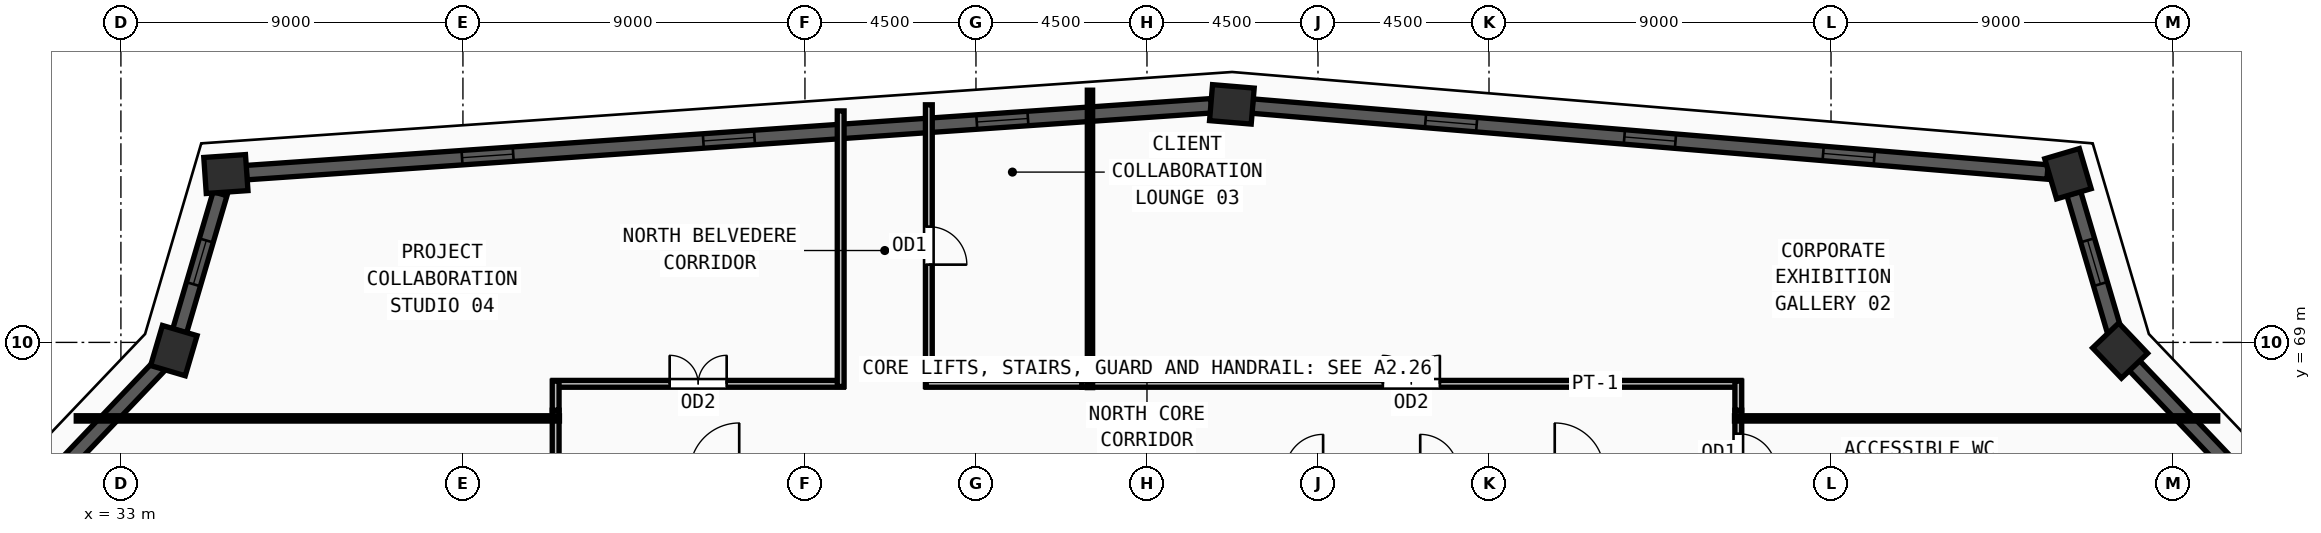
"""IFC4 building model, lengths in metres.
Left out: names, types, materials, properties, quantities, classifications, styles, units other than length and angle.
Written with IfcOpenShell. Run it as: python <this file> out.ifc"""

import sys

from ifc_helpers import new_model, si_unit, direction, frame, frame_2d, origin, origin_2d, place, context, subcontext, project, spatial, rectangle, extrude, source, transform, mapped, element, fill, save


model = new_model("IFC4")
c1 = context("Model", 3, precision=1e-05, world=origin(), true_north=direction((0.0, 1.0)))
c2 = subcontext(c1, "Body", "Model", "MODEL_VIEW")
j1 = project(units=[si_unit("LENGTHUNIT", "METRE"), si_unit("PLANEANGLEUNIT", "RADIAN")], contexts=[c1])
p1 = place(None, origin())
s1 = spatial("IfcSite", under=j1, at=p1, CompositionType="ELEMENT")
p2 = place(p1, origin())
s2 = spatial("IfcBuilding", under=s1, at=p2, CompositionType="ELEMENT")
p3 = place(p2, frame((0.0, 0.0, 339.75)))
s3 = spatial("IfcBuildingStorey", under=s2, at=p3, CompositionType="ELEMENT", Elevation=339.75)
m1 = source(origin(), c2, "Body", "SweptSolid", [
    extrude(rectangle(XDim=1.1, YDim=0.95, at=origin_2d()), origin(), (0.0, 0.0, 1.0), 3.75),
])
for number, where, z_axis, x_axis in (
    (1, (34.393, 68.784, 0.0), (0.0, 0.0, 1.0), (0.283, 0.959, 0.0)),
    (2, (35.762, 73.43, 0.0), (0.0, 0.0, 1.0), (0.998, 0.069, 0.0)),
    (3, (62.234, 75.263, 0.0), (0.0, 0.0, 1.0), (-0.997, 0.083, 0.0)),
    (4, (84.235, 73.438, 0.0), (0.0, 0.0, 1.0), (-0.283, 0.959, 0.0)),
    (5, (85.607, 68.784, 0.0), (0.0, 0.0, 1.0), (-0.689, 0.724, 0.0)),
):
    element("IfcColumn", number, at=place(p3, frame(where, z_axis=z_axis, x_axis=x_axis)), inside=s3, PredefinedType="COLUMN", context=c2, shape_type="MappedRepresentation", body=[
        mapped(m1, transform((0.0, 0.0, 0.0), x_axis=(1.0, 0.0, 0.0), y_axis=(0.0, 1.0, 0.0), z_axis=(0.0, 0.0, 1.0), scale=1.0)),
    ])
p4 = place(p3, frame((88.574, 65.667, 0.0), z_axis=(0.0, 0.0, 1.0), x_axis=(-0.689475358223, 0.72430914008, 0.0)))
e6 = element("IfcWall", 6, at=p4, inside=s3, PredefinedType="SOLIDWALL", context=c2, shape_type="SweptSolid", body=[
    extrude(rectangle(XDim=3.764, YDim=0.38, at=frame_2d((1.882, 0.0))), origin(), (0.0, 0.0, 1.0), 3.57),
])
p5 = place(p3, frame((85.454, 69.302, 0.0), z_axis=(0.0, 0.0, 1.0), x_axis=(-0.282670922676, 0.95921694599, 0.0)))
e7 = element("IfcWall", 7, at=p5, inside=s3, PredefinedType="SOLIDWALL", context=c2, shape_type="SweptSolid", body=[
    extrude(rectangle(XDim=3.772, YDim=0.38, at=frame_2d((1.886, 0.0))), origin(), (0.0, 0.0, 1.0), 3.57),
])
m2 = source(origin(), c2, "Body", "SweptSolid", [
    extrude(rectangle(XDim=1.2, YDim=1.9, at=frame_2d((0.6, 0.95))), frame((0.0, 0.2, 0.0), z_axis=(0.0, -1.0, 0.0), x_axis=(1.0, 0.0, 0.0)), (0.0, 0.0, 1.0), 0.4),
])
p6 = place(p5, frame((1.286, 0.0, 0.55)))
e8 = element("IfcOpeningElement", 8, at=p6, cuts=e7, PredefinedType="OPENING", context=c2, shape_type="MappedRepresentation", body=[
    mapped(m2, transform((0.0, 0.0, 0.0), x_axis=(1.0, 0.0, 0.0), y_axis=(0.0, 1.0, 0.0), z_axis=(0.0, 0.0, 1.0), scale=1.0)),
])
p7 = place(p3, frame((83.697, 73.483, 0.0), z_axis=(0.0, 0.0, 1.0), x_axis=(-0.996579754875, 0.082636506293, 0.0)))
e9 = element("IfcWall", 9, at=p7, inside=s3, PredefinedType="SOLIDWALL", context=c2, shape_type="SweptSolid", body=[
    extrude(rectangle(XDim=20.997, YDim=0.38, at=frame_2d((10.499, 0.0))), origin(), (0.0, 0.0, 1.0), 3.57),
])
m3 = source(origin(), c2, "Body", "SweptSolid", [
    extrude(rectangle(XDim=1.35, YDim=1.85, at=frame_2d((0.675, 0.925))), frame((0.0, 0.2, 0.0), z_axis=(0.0, -1.0, 0.0), x_axis=(1.0, 0.0, 0.0)), (0.0, 0.0, 1.0), 0.4),
])
p8 = place(p7, frame((4.574, 0.0, 0.55)))
e10 = element("IfcOpeningElement", 10, at=p8, cuts=e9, PredefinedType="OPENING", context=c2, shape_type="MappedRepresentation", body=[
    mapped(m3, transform((0.0, 0.0, 0.0), x_axis=(1.0, 0.0, 0.0), y_axis=(0.0, 1.0, 0.0), z_axis=(0.0, 0.0, 1.0), scale=1.0)),
])
p9 = place(p7, frame((9.823, 0.0, 0.55)))
e11 = element("IfcOpeningElement", 11, at=p9, cuts=e9, PredefinedType="OPENING", context=c2, shape_type="MappedRepresentation", body=[
    mapped(m3, transform((0.0, 0.0, 0.0), x_axis=(1.0, 0.0, 0.0), y_axis=(0.0, 1.0, 0.0), z_axis=(0.0, 0.0, 1.0), scale=1.0)),
])
p10 = place(p7, frame((15.073, 0.0, 0.55)))
e12 = element("IfcOpeningElement", 12, at=p10, cuts=e9, PredefinedType="OPENING", context=c2, shape_type="MappedRepresentation", body=[
    mapped(m3, transform((0.0, 0.0, 0.0), x_axis=(1.0, 0.0, 0.0), y_axis=(0.0, 1.0, 0.0), z_axis=(0.0, 0.0, 1.0), scale=1.0)),
])
p11 = place(p3, frame((61.695, 75.226, 0.0), z_axis=(0.0, 0.0, 1.0), x_axis=(-0.997609466084, -0.06910393027, 0.0)))
e13 = element("IfcWall", 13, at=p11, inside=s3, PredefinedType="SOLIDWALL", context=c2, shape_type="SweptSolid", body=[
    extrude(rectangle(XDim=25.455, YDim=0.38, at=frame_2d((12.728, 0.0))), origin(), (0.0, 0.0, 1.0), 3.57),
])
p12 = place(p11, frame((4.839, 0.0, 0.55)))
e14 = element("IfcOpeningElement", 14, at=p12, cuts=e13, PredefinedType="OPENING", context=c2, shape_type="MappedRepresentation", body=[
    mapped(m3, transform((0.0, 0.0, 0.0), x_axis=(1.0, 0.0, 0.0), y_axis=(0.0, 1.0, 0.0), z_axis=(0.0, 0.0, 1.0), scale=1.0)),
])
p13 = place(p11, frame((12.052, 0.0, 0.55)))
e15 = element("IfcOpeningElement", 15, at=p13, cuts=e13, PredefinedType="OPENING", context=c2, shape_type="MappedRepresentation", body=[
    mapped(m3, transform((0.0, 0.0, 0.0), x_axis=(1.0, 0.0, 0.0), y_axis=(0.0, 1.0, 0.0), z_axis=(0.0, 0.0, 1.0), scale=1.0)),
])
p14 = place(p11, frame((18.416, 0.0, 0.55)))
e16 = element("IfcOpeningElement", 16, at=p14, cuts=e13, PredefinedType="OPENING", context=c2, shape_type="MappedRepresentation", body=[
    mapped(m3, transform((0.0, 0.0, 0.0), x_axis=(1.0, 0.0, 0.0), y_axis=(0.0, 1.0, 0.0), z_axis=(0.0, 0.0, 1.0), scale=1.0)),
])
p15 = place(p3, frame((35.609, 72.912, 0.0), z_axis=(0.0, 0.0, 1.0), x_axis=(-0.282457827071, -0.959279717249, 0.0)))
e17 = element("IfcWall", 17, at=p15, inside=s3, PredefinedType="SOLIDWALL", context=c2, shape_type="SweptSolid", body=[
    extrude(rectangle(XDim=3.763, YDim=0.38, at=frame_2d((1.882, 0.0))), origin(), (0.0, 0.0, 1.0), 3.57),
])
p16 = place(p15, frame((1.282, 0.0, 0.55)))
e18 = element("IfcOpeningElement", 18, at=p16, cuts=e17, PredefinedType="OPENING", context=c2, shape_type="MappedRepresentation", body=[
    mapped(m2, transform((0.0, 0.0, 0.0), x_axis=(1.0, 0.0, 0.0), y_axis=(0.0, 1.0, 0.0), z_axis=(0.0, 0.0, 1.0), scale=1.0)),
])
p17 = place(p3, frame((34.021, 68.393, 0.0), z_axis=(0.0, 0.0, 1.0), x_axis=(-0.689516179324, -0.724270279972, 0.0)))
e19 = element("IfcWall", 19, at=p17, inside=s3, PredefinedType="SOLIDWALL", context=c2, shape_type="SweptSolid", body=[
    extrude(rectangle(XDim=3.772, YDim=0.38, at=frame_2d((1.886, 0.0))), origin(), (0.0, 0.0, 1.0), 3.57),
])
p18 = place(p3, frame((75.56, 67.215, 0.0), z_axis=(0.0, 0.0, 1.0), x_axis=(0.0, -1.0, 0.0)))
e20 = element("IfcWall", 20, at=p18, inside=s3, PredefinedType="PARTITIONING", context=c2, shape_type="SweptSolid", body=[
    extrude(rectangle(XDim=2.235, YDim=0.18, at=frame_2d((1.118, 0.0))), origin(), (0.0, 0.0, 1.0), 3.57),
])
m4 = source(origin(), c2, "Body", "SweptSolid", [
    extrude(rectangle(XDim=1.0, YDim=2.2, at=frame_2d((0.5, 1.1))), frame((0.0, 0.1, 0.0), z_axis=(0.0, -1.0, 0.0), x_axis=(1.0, 0.0, 0.0)), (0.0, 0.0, 1.0), 0.2),
])
p19 = place(p18, frame((0.617, 0.0, 0.0)))
e21 = element("IfcOpeningElement", 21, at=p19, cuts=e20, PredefinedType="OPENING", context=c2, shape_type="MappedRepresentation", body=[
    mapped(m4, transform((0.0, 0.0, 0.0), x_axis=(1.0, 0.0, 0.0), y_axis=(0.0, 1.0, 0.0), z_axis=(0.0, 0.0, 1.0), scale=1.0)),
])
p20 = place(p3, frame((58.285, 67.91, 0.0), z_axis=(0.0, 0.0, 1.0), x_axis=(1.0, 0.0, 0.0)))
e22 = element("IfcWall", 22, at=p20, inside=s3, PredefinedType="PARTITIONING", context=c2, shape_type="SweptSolid", body=[
    extrude(rectangle(XDim=17.345, YDim=0.18, at=frame_2d((8.672, 0.0))), origin(), (0.0, 0.0, 1.0), 3.57),
])
m5 = source(origin(), c2, "Body", "SweptSolid", [
    extrude(rectangle(XDim=1.5, YDim=2.2, at=frame_2d((0.75, 1.1))), frame((0.0, 0.1, 0.0), z_axis=(0.0, -1.0, 0.0), x_axis=(1.0, 0.0, 0.0)), (0.0, 0.0, 1.0), 0.2),
])
p21 = place(p20, frame((7.922, 0.0, 0.0)))
e23 = element("IfcOpeningElement", 23, at=p21, cuts=e22, PredefinedType="OPENING", context=c2, shape_type="MappedRepresentation", body=[
    mapped(m5, transform((0.0, 0.0, 0.0), x_axis=(1.0, 0.0, 0.0), y_axis=(0.0, 1.0, 0.0), z_axis=(0.0, 0.0, 1.0), scale=1.0)),
])
p22 = place(p3, frame((54.26, 75.252, 0.0), z_axis=(0.0, 0.0, 1.0), x_axis=(0.0, -1.0, 0.0)))
e24 = element("IfcWall", 24, at=p22, inside=s3, PredefinedType="PARTITIONING", context=c2, shape_type="SweptSolid", body=[
    extrude(rectangle(XDim=7.412, YDim=0.18, at=frame_2d((3.706, 0.0))), origin(), (0.0, 0.0, 1.0), 3.57),
])
p23 = place(p22, frame((3.206, 0.0, 0.0)))
e25 = element("IfcOpeningElement", 25, at=p23, cuts=e24, PredefinedType="OPENING", context=c2, shape_type="MappedRepresentation", body=[
    mapped(m4, transform((0.0, 0.0, 0.0), x_axis=(1.0, 0.0, 0.0), y_axis=(0.0, 1.0, 0.0), z_axis=(0.0, 0.0, 1.0), scale=1.0)),
])
p24 = place(p3, frame((44.37, 67.91, 0.0), z_axis=(0.0, 0.0, 1.0), x_axis=(1.0, 0.0, 0.0)))
e26 = element("IfcWall", 26, at=p24, inside=s3, PredefinedType="PARTITIONING", context=c2, shape_type="SweptSolid", body=[
    extrude(rectangle(XDim=7.64, YDim=0.18, at=frame_2d((3.82, 0.0))), origin(), (0.0, 0.0, 1.0), 3.57),
])
p25 = place(p24, frame((3.07, 0.0, 0.0)))
e27 = element("IfcOpeningElement", 27, at=p25, cuts=e26, PredefinedType="OPENING", context=c2, shape_type="MappedRepresentation", body=[
    mapped(m5, transform((0.0, 0.0, 0.0), x_axis=(1.0, 0.0, 0.0), y_axis=(0.0, 1.0, 0.0), z_axis=(0.0, 0.0, 1.0), scale=1.0)),
])
p26 = place(p3, frame((44.44, 54.285, 0.0), z_axis=(0.0, 0.0, 1.0), x_axis=(0.0, 1.0, 0.0)))
e28 = element("IfcWall", 28, at=p26, inside=s3, PredefinedType="PARTITIONING", context=c2, shape_type="SweptSolid", body=[
    extrude(rectangle(XDim=12.93, YDim=0.18, at=frame_2d((6.465, 0.0))), origin(), (0.0, 0.0, 1.0), 3.261),
])
p27 = place(p26, frame((5.715, 0.0, 0.0)))
e29 = element("IfcOpeningElement", 29, at=p27, cuts=e28, PredefinedType="OPENING", context=c2, shape_type="MappedRepresentation", body=[
    mapped(m5, transform((0.0, 0.0, 0.0), x_axis=(1.0, 0.0, 0.0), y_axis=(0.0, 1.0, 0.0), z_axis=(0.0, 0.0, 1.0), scale=1.0)),
])
p28 = place(p3, frame((75.56, 67.98, 0.0), z_axis=(0.0, 0.0, 1.0), x_axis=(0.0, -1.0, 0.0)))
e30 = element("IfcWall", 30, at=p28, inside=s3, PredefinedType="PARTITIONING", context=c2, shape_type="SweptSolid", body=[
    extrude(rectangle(XDim=0.765, YDim=0.18, at=frame_2d((0.382, 0.0))), origin(), (0.0, 0.0, 1.0), 3.57),
])
p29 = place(p3, frame((54.19, 67.91, 0.0), z_axis=(0.0, 0.0, 1.0), x_axis=(1.0, 0.0, 0.0)))
e31 = element("IfcWall", 31, at=p29, inside=s3, PredefinedType="PARTITIONING", context=c2, shape_type="SweptSolid", body=[
    extrude(rectangle(XDim=4.095, YDim=0.18, at=frame_2d((2.047, 0.0))), origin(), (0.0, 0.0, 1.0), 3.57),
])
p30 = place(p3, frame((51.94, 67.84, 0.0), z_axis=(0.0, 0.0, 1.0), x_axis=(0.0, 1.0, 0.0)))
e32 = element("IfcWall", 32, at=p30, inside=s3, PredefinedType="PARTITIONING", context=c2, shape_type="SweptSolid", body=[
    extrude(rectangle(XDim=7.251, YDim=0.18, at=frame_2d((3.625, 0.0))), origin(), (0.0, 0.0, 1.0), 3.57),
])
p31 = place(p3, frame((44.44, 67.215, 0.0), z_axis=(0.0, 0.0, 1.0), x_axis=(0.0, 1.0, 0.0)))
e33 = element("IfcWall", 33, at=p31, inside=s3, PredefinedType="PARTITIONING", context=c2, shape_type="SweptSolid", body=[
    extrude(rectangle(XDim=0.765, YDim=0.18, at=frame_2d((0.382, 0.0))), origin(), (0.0, 0.0, 1.0), 3.57),
])
for number, where, z_axis, x_axis in (
    (34, (44.54, 67.0, 0.0), (0.0, 0.0, 1.0), (-1.0, 0.0, 0.0)),
    (35, (75.46, 67.0, 0.0), (0.0, 0.0, 1.0), (1.0, 0.0, 0.0)),
):
    element("IfcWall", number, at=place(p3, frame(where, z_axis=z_axis, x_axis=x_axis)), inside=s3, PredefinedType="PARTITIONING", context=c2, shape_type="SweptSolid", body=[
        extrude(rectangle(XDim=12.715, YDim=0.14, at=frame_2d((6.357, 0.0))), origin(), (0.0, 0.0, 1.0), 3.57),
    ])
p32 = place(p3, frame((58.5, 67.81, 0.0), z_axis=(0.0, 0.0, 1.0), x_axis=(0.0, 1.0, 0.0)))
e36 = element("IfcWall", 36, at=p32, inside=s3, PredefinedType="PARTITIONING", context=c2, shape_type="SweptSolid", body=[
    extrude(rectangle(XDim=7.826, YDim=0.14, at=frame_2d((3.913, 0.0))), origin(), (0.0, 0.0, 1.0), 3.57),
])
m6 = source(origin(), c2, "Body", "SweptSolid", [
    extrude(rectangle(XDim=1.2, YDim=1.9, at=frame_2d((0.6, 0.95))), frame((0.0, 0.03, 0.0), z_axis=(0.0, -1.0, 0.0), x_axis=(1.0, 0.0, 0.0)), (0.0, 0.0, 1.0), 0.06),
])
p33 = place(p6, origin())
e37 = element("IfcWindow", 37, at=p33, inside=s3, PartitioningType="SINGLE_PANEL", PredefinedType="WINDOW", context=c2, shape_type="MappedRepresentation", body=[
    mapped(m6, transform((0.0, 0.0, 0.0), x_axis=(1.0, 0.0, 0.0), y_axis=(0.0, 1.0, 0.0), z_axis=(0.0, 0.0, 1.0), scale=1.0)),
])
fill(e8, e37)
m7 = source(origin(), c2, "Body", "SweptSolid", [
    extrude(rectangle(XDim=1.35, YDim=1.85, at=frame_2d((0.675, 0.925))), frame((0.0, 0.03, 0.0), z_axis=(0.0, -1.0, 0.0), x_axis=(1.0, 0.0, 0.0)), (0.0, 0.0, 1.0), 0.06),
])
p34 = place(p8, origin())
e38 = element("IfcWindow", 38, at=p34, inside=s3, PartitioningType="SINGLE_PANEL", PredefinedType="WINDOW", context=c2, shape_type="MappedRepresentation", body=[
    mapped(m7, transform((0.0, 0.0, 0.0), x_axis=(1.0, 0.0, 0.0), y_axis=(0.0, 1.0, 0.0), z_axis=(0.0, 0.0, 1.0), scale=1.0)),
])
fill(e10, e38)
p35 = place(p9, origin())
e39 = element("IfcWindow", 39, at=p35, inside=s3, PartitioningType="SINGLE_PANEL", PredefinedType="WINDOW", context=c2, shape_type="MappedRepresentation", body=[
    mapped(m7, transform((0.0, 0.0, 0.0), x_axis=(1.0, 0.0, 0.0), y_axis=(0.0, 1.0, 0.0), z_axis=(0.0, 0.0, 1.0), scale=1.0)),
])
fill(e11, e39)
p36 = place(p10, origin())
e40 = element("IfcWindow", 40, at=p36, inside=s3, PartitioningType="SINGLE_PANEL", PredefinedType="WINDOW", context=c2, shape_type="MappedRepresentation", body=[
    mapped(m7, transform((0.0, 0.0, 0.0), x_axis=(1.0, 0.0, 0.0), y_axis=(0.0, 1.0, 0.0), z_axis=(0.0, 0.0, 1.0), scale=1.0)),
])
fill(e12, e40)
p37 = place(p12, origin())
e41 = element("IfcWindow", 41, at=p37, inside=s3, PartitioningType="SINGLE_PANEL", PredefinedType="WINDOW", context=c2, shape_type="MappedRepresentation", body=[
    mapped(m7, transform((0.0, 0.0, 0.0), x_axis=(1.0, 0.0, 0.0), y_axis=(0.0, 1.0, 0.0), z_axis=(0.0, 0.0, 1.0), scale=1.0)),
])
fill(e14, e41)
p38 = place(p13, origin())
e42 = element("IfcWindow", 42, at=p38, inside=s3, PartitioningType="SINGLE_PANEL", PredefinedType="WINDOW", context=c2, shape_type="MappedRepresentation", body=[
    mapped(m7, transform((0.0, 0.0, 0.0), x_axis=(1.0, 0.0, 0.0), y_axis=(0.0, 1.0, 0.0), z_axis=(0.0, 0.0, 1.0), scale=1.0)),
])
fill(e15, e42)
p39 = place(p14, origin())
e43 = element("IfcWindow", 43, at=p39, inside=s3, PartitioningType="SINGLE_PANEL", PredefinedType="WINDOW", context=c2, shape_type="MappedRepresentation", body=[
    mapped(m7, transform((0.0, 0.0, 0.0), x_axis=(1.0, 0.0, 0.0), y_axis=(0.0, 1.0, 0.0), z_axis=(0.0, 0.0, 1.0), scale=1.0)),
])
fill(e16, e43)
p40 = place(p16, origin())
e44 = element("IfcWindow", 44, at=p40, inside=s3, PartitioningType="SINGLE_PANEL", PredefinedType="WINDOW", context=c2, shape_type="MappedRepresentation", body=[
    mapped(m6, transform((0.0, 0.0, 0.0), x_axis=(1.0, 0.0, 0.0), y_axis=(0.0, 1.0, 0.0), z_axis=(0.0, 0.0, 1.0), scale=1.0)),
])
fill(e18, e44)
m8 = source(origin(), c2, "Body", "SweptSolid", [
    extrude(rectangle(XDim=1.0, YDim=2.2, at=frame_2d((0.5, 1.1))), frame((0.0, 0.025, 0.0), z_axis=(0.0, -1.0, 0.0), x_axis=(1.0, 0.0, 0.0)), (0.0, 0.0, 1.0), 0.05),
])
p41 = place(p19, origin())
e45 = element("IfcDoor", 45, at=p41, inside=s3, OperationType="SINGLE_SWING_RIGHT", PredefinedType="DOOR", context=c2, shape_type="MappedRepresentation", body=[
    mapped(m8, transform((0.0, 0.0, 0.0), x_axis=(1.0, 0.0, 0.0), y_axis=(0.0, 1.0, 0.0), z_axis=(0.0, 0.0, 1.0), scale=1.0)),
])
fill(e21, e45)
m9 = source(origin(), c2, "Body", "SweptSolid", [
    extrude(rectangle(XDim=1.5, YDim=2.2, at=frame_2d((0.75, 1.1))), frame((0.0, 0.025, 0.0), z_axis=(0.0, -1.0, 0.0), x_axis=(1.0, 0.0, 0.0)), (0.0, 0.0, 1.0), 0.05),
])
p42 = place(p21, origin())
e46 = element("IfcDoor", 46, at=p42, inside=s3, OperationType="DOUBLE_DOOR_SINGLE_SWING", PredefinedType="DOOR", context=c2, shape_type="MappedRepresentation", body=[
    mapped(m9, transform((0.0, 0.0, 0.0), x_axis=(1.0, 0.0, 0.0), y_axis=(0.0, 1.0, 0.0), z_axis=(0.0, 0.0, 1.0), scale=1.0)),
])
fill(e23, e46)
p43 = place(p23, origin())
e47 = element("IfcDoor", 47, at=p43, inside=s3, OperationType="SINGLE_SWING_RIGHT", PredefinedType="DOOR", context=c2, shape_type="MappedRepresentation", body=[
    mapped(m8, transform((0.0, 0.0, 0.0), x_axis=(1.0, 0.0, 0.0), y_axis=(0.0, 1.0, 0.0), z_axis=(0.0, 0.0, 1.0), scale=1.0)),
])
fill(e25, e47)
p44 = place(p25, origin())
e48 = element("IfcDoor", 48, at=p44, inside=s3, OperationType="DOUBLE_DOOR_SINGLE_SWING", PredefinedType="DOOR", context=c2, shape_type="MappedRepresentation", body=[
    mapped(m9, transform((0.0, 0.0, 0.0), x_axis=(1.0, 0.0, 0.0), y_axis=(0.0, 1.0, 0.0), z_axis=(0.0, 0.0, 1.0), scale=1.0)),
])
fill(e27, e48)
save(model, sys.argv[1])
